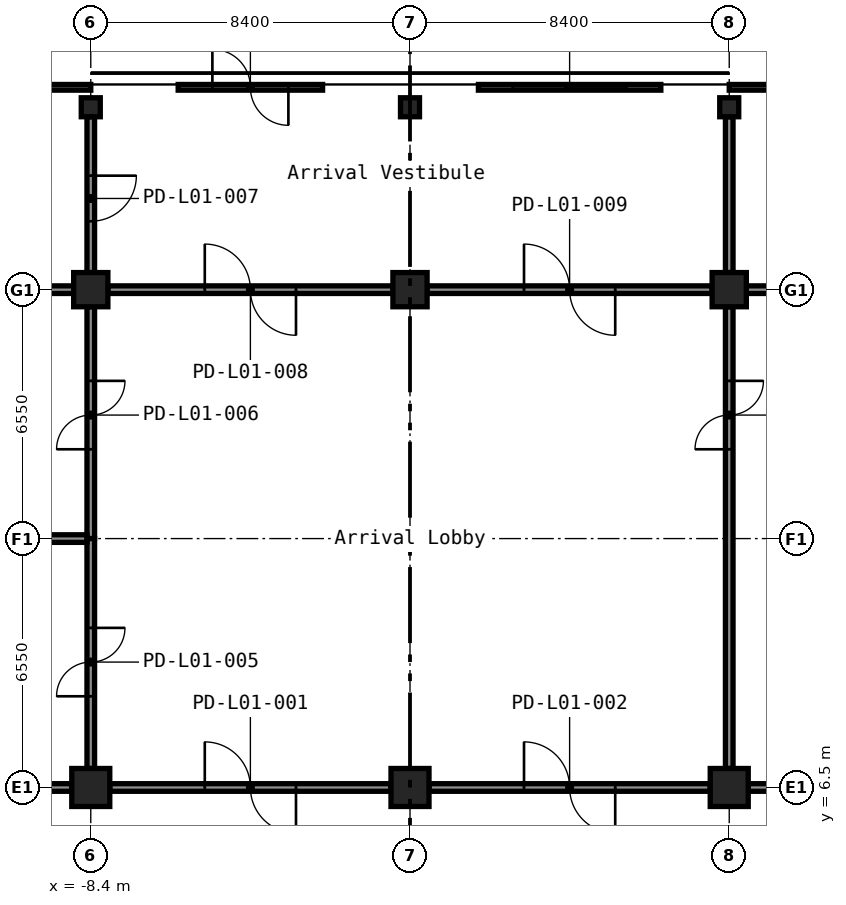
"""IFC4 building model, lengths in metres.
Left out: names, types, materials, properties, quantities, classifications, styles, units other than length and angle.
Written with IfcOpenShell. Run it as: python <this file> out.ifc"""

import sys

from ifc_helpers import new_model, si_unit, direction, frame, frame_2d, origin, origin_2d, place, context, subcontext, project, spatial, rectangle, hollow_rectangle, extrude, element, fill, save


model = new_model("IFC4")
c1 = context("Model", 3, precision=1e-05, world=origin(), true_north=direction((0.0, 1.0)))
c2 = subcontext(c1, "Body", "Model", "MODEL_VIEW")
j1 = project(units=[si_unit("LENGTHUNIT", "METRE"), si_unit("PLANEANGLEUNIT", "RADIAN")], contexts=[c1])
p1 = place(None, origin())
s1 = spatial("IfcSite", under=j1, at=p1, CompositionType="ELEMENT")
p2 = place(p1, origin())
s2 = spatial("IfcBuilding", under=s1, at=p2, CompositionType="ELEMENT")
p3 = place(p2, origin())
s3 = spatial("IfcBuildingStorey", under=s2, at=p3, CompositionType="ELEMENT", Elevation=0.0)
p4 = place(p3, frame((-8.4, 6.5, -0.3), z_axis=(0.0, 0.0, 1.0), x_axis=(1.0, 0.0, 0.0)))
e1 = element("IfcColumn", 1, at=p4, inside=s3, PredefinedType="COLUMN", context=c2, shape_type="SweptSolid", body=[
    extrude(hollow_rectangle(XDim=1.0, YDim=1.0, WallThickness=0.04, at=origin_2d()), origin(), (0.0, 0.0, 1.0), 8.9),
])
p5 = place(p3, frame((-8.4, 19.6, -0.3), z_axis=(0.0, 0.0, 1.0), x_axis=(1.0, 0.0, 0.0)))
e2 = element("IfcColumn", 2, at=p5, inside=s3, PredefinedType="COLUMN", context=c2, shape_type="SweptSolid", body=[
    extrude(hollow_rectangle(XDim=0.9, YDim=0.9, WallThickness=0.036, at=origin_2d()), origin(), (0.0, 0.0, 1.0), 8.9),
])
p6 = place(p3, frame((0.0, 6.5, -0.3), z_axis=(0.0, 0.0, 1.0), x_axis=(1.0, 0.0, 0.0)))
e3 = element("IfcColumn", 3, at=p6, inside=s3, PredefinedType="COLUMN", context=c2, shape_type="SweptSolid", body=[
    extrude(hollow_rectangle(XDim=1.0, YDim=1.0, WallThickness=0.04, at=origin_2d()), origin(), (0.0, 0.0, 1.0), 8.9),
])
p7 = place(p3, frame((0.0, 19.6, -0.3), z_axis=(0.0, 0.0, 1.0), x_axis=(1.0, 0.0, 0.0)))
e4 = element("IfcColumn", 4, at=p7, inside=s3, PredefinedType="COLUMN", context=c2, shape_type="SweptSolid", body=[
    extrude(hollow_rectangle(XDim=0.9, YDim=0.9, WallThickness=0.036, at=origin_2d()), origin(), (0.0, 0.0, 1.0), 8.9),
])
p8 = place(p3, frame((8.4, 6.5, -0.3), z_axis=(0.0, 0.0, 1.0), x_axis=(1.0, 0.0, 0.0)))
e5 = element("IfcColumn", 5, at=p8, inside=s3, PredefinedType="COLUMN", context=c2, shape_type="SweptSolid", body=[
    extrude(hollow_rectangle(XDim=1.0, YDim=1.0, WallThickness=0.04, at=origin_2d()), origin(), (0.0, 0.0, 1.0), 8.9),
])
p9 = place(p3, frame((8.4, 19.6, -0.3), z_axis=(0.0, 0.0, 1.0), x_axis=(1.0, 0.0, 0.0)))
e6 = element("IfcColumn", 6, at=p9, inside=s3, PredefinedType="COLUMN", context=c2, shape_type="SweptSolid", body=[
    extrude(hollow_rectangle(XDim=0.9, YDim=0.9, WallThickness=0.036, at=origin_2d()), origin(), (0.0, 0.0, 1.0), 8.9),
])
for number, where, z_axis, x_axis in (
    (7, (-8.4, 24.4, -0.3), (0.0, 0.0, 1.0), (1.0, 0.0, 0.0)),
    (8, (0.0, 24.4, -0.3), (0.0, 0.0, 1.0), (1.0, 0.0, 0.0)),
    (9, (8.4, 24.4, -0.3), (0.0, 0.0, 1.0), (1.0, 0.0, 0.0)),
):
    element("IfcColumn", number, at=place(p3, frame(where, z_axis=z_axis, x_axis=x_axis)), inside=s3, PredefinedType="COLUMN", context=c2, shape_type="SweptSolid", body=[
        extrude(hollow_rectangle(XDim=0.5, YDim=0.5, WallThickness=0.019, InnerFilletRadius=0.029, OuterFilletRadius=0.048, at=origin_2d()), origin(), (0.0, 0.0, 1.0), 8.9),
    ])
p10 = place(p3, frame((-8.4, 20.05, 0.0), z_axis=(0.0, 0.0, 1.0), x_axis=(0.0, 1.0, 0.0)))
e10 = element("IfcWall", 10, at=p10, inside=s3, PredefinedType="PARTITIONING", context=c2, shape_type="SweptSolid", body=[
    extrude(rectangle(XDim=4.1, YDim=0.2, at=frame_2d((2.05, 0.0))), origin(), (0.0, 0.0, 1.0), 8.6),
])
p11 = place(p10, frame((1.35, 0.0, 0.0)))
e11 = element("IfcOpeningElement", 11, at=p11, cuts=e10, PredefinedType="OPENING", context=c2, shape_type="SweptSolid", body=[
    extrude(rectangle(XDim=1.2, YDim=2.1, at=frame_2d((0.6, 1.05))), frame((0.0, 0.11, 0.0), z_axis=(0.0, -1.0, 0.0), x_axis=(1.0, 0.0, 0.0)), (0.0, 0.0, 1.0), 0.22),
])
p12 = place(p3, frame((8.4, 24.15, 0.0), z_axis=(0.0, 0.0, 1.0), x_axis=(0.0, -1.0, 0.0)))
e12 = element("IfcWall", 12, at=p12, inside=s3, PredefinedType="PARTITIONING", context=c2, shape_type="SweptSolid", body=[
    extrude(rectangle(XDim=4.1, YDim=0.2, at=frame_2d((2.05, 0.0))), origin(), (0.0, 0.0, 1.0), 8.6),
])
p13 = place(p3, frame((-16.35, 19.6, 0.0), z_axis=(0.0, 0.0, 1.0), x_axis=(1.0, 0.0, 0.0)))
e13 = element("IfcWall", 13, at=p13, inside=s3, PredefinedType="PARTITIONING", context=c2, shape_type="SweptSolid", body=[
    extrude(rectangle(XDim=7.5, YDim=0.2, at=frame_2d((3.75, 0.0))), origin(), (0.0, 0.0, 1.0), 8.6),
])
p14 = place(p3, frame((8.9, 6.5, 0.0), z_axis=(0.0, 0.0, 1.0), x_axis=(1.0, 0.0, 0.0)))
e14 = element("IfcWall", 14, at=p14, inside=s3, PredefinedType="PARTITIONING", context=c2, shape_type="SweptSolid", body=[
    extrude(rectangle(XDim=3.1, YDim=0.2, at=frame_2d((1.55, 0.0))), origin(), (0.0, 0.0, 1.0), 8.6),
])
p15 = place(p3, frame((-7.9, 6.5, 0.0), z_axis=(0.0, 0.0, 1.0), x_axis=(1.0, 0.0, 0.0)))
e15 = element("IfcWall", 15, at=p15, inside=s3, PredefinedType="PARTITIONING", context=c2, shape_type="SweptSolid", body=[
    extrude(rectangle(XDim=7.4, YDim=0.2, at=frame_2d((3.7, 0.0))), origin(), (0.0, 0.0, 1.0), 8.6),
])
p16 = place(p15, frame((2.5, 0.0, 0.0)))
e16 = element("IfcOpeningElement", 16, at=p16, cuts=e15, PredefinedType="OPENING", context=c2, shape_type="SweptSolid", body=[
    extrude(rectangle(XDim=2.4, YDim=2.1, at=frame_2d((1.2, 1.05))), frame((0.0, 0.11, 0.0), z_axis=(0.0, -1.0, 0.0), x_axis=(1.0, 0.0, 0.0)), (0.0, 0.0, 1.0), 0.22),
])
p17 = place(p3, frame((0.5, 6.5, 0.0), z_axis=(0.0, 0.0, 1.0), x_axis=(1.0, 0.0, 0.0)))
e17 = element("IfcWall", 17, at=p17, inside=s3, PredefinedType="PARTITIONING", context=c2, shape_type="SweptSolid", body=[
    extrude(rectangle(XDim=7.4, YDim=0.2, at=frame_2d((3.7, 0.0))), origin(), (0.0, 0.0, 1.0), 8.6),
])
p18 = place(p17, frame((2.5, 0.0, 0.0)))
e18 = element("IfcOpeningElement", 18, at=p18, cuts=e17, PredefinedType="OPENING", context=c2, shape_type="SweptSolid", body=[
    extrude(rectangle(XDim=2.4, YDim=2.1, at=frame_2d((1.2, 1.05))), frame((0.0, 0.11, 0.0), z_axis=(0.0, -1.0, 0.0), x_axis=(1.0, 0.0, 0.0)), (0.0, 0.0, 1.0), 0.22),
])
p19 = place(p3, frame((-12.0, 6.5, 0.0), z_axis=(0.0, 0.0, 1.0), x_axis=(1.0, 0.0, 0.0)))
e19 = element("IfcWall", 19, at=p19, inside=s3, PredefinedType="PARTITIONING", context=c2, shape_type="SweptSolid", body=[
    extrude(rectangle(XDim=3.1, YDim=0.2, at=frame_2d((1.55, 0.0))), origin(), (0.0, 0.0, 1.0), 8.6),
])
p20 = place(p3, frame((8.85, 19.6, 0.0), z_axis=(0.0, 0.0, 1.0), x_axis=(1.0, 0.0, 0.0)))
e20 = element("IfcWall", 20, at=p20, inside=s3, PredefinedType="PARTITIONING", context=c2, shape_type="SweptSolid", body=[
    extrude(rectangle(XDim=7.5, YDim=0.2, at=frame_2d((3.75, 0.0))), origin(), (0.0, 0.0, 1.0), 8.6),
])
p21 = place(p20, frame((2.55, 0.0, 0.0)))
e21 = element("IfcOpeningElement", 21, at=p21, cuts=e20, PredefinedType="OPENING", context=c2, shape_type="SweptSolid", body=[
    extrude(rectangle(XDim=2.4, YDim=2.1, at=frame_2d((1.2, 1.05))), frame((0.0, 0.11, 0.0), z_axis=(0.0, -1.0, 0.0), x_axis=(1.0, 0.0, 0.0)), (0.0, 0.0, 1.0), 0.22),
])
p22 = place(p3, frame((-7.95, 19.6, 0.0), z_axis=(0.0, 0.0, 1.0), x_axis=(1.0, 0.0, 0.0)))
e22 = element("IfcWall", 22, at=p22, inside=s3, PredefinedType="PARTITIONING", context=c2, shape_type="SweptSolid", body=[
    extrude(rectangle(XDim=7.5, YDim=0.2, at=frame_2d((3.75, 0.0))), origin(), (0.0, 0.0, 1.0), 8.6),
])
p23 = place(p22, frame((2.55, 0.0, 0.0)))
e23 = element("IfcOpeningElement", 23, at=p23, cuts=e22, PredefinedType="OPENING", context=c2, shape_type="SweptSolid", body=[
    extrude(rectangle(XDim=2.4, YDim=2.1, at=frame_2d((1.2, 1.05))), frame((0.0, 0.11, 0.0), z_axis=(0.0, -1.0, 0.0), x_axis=(1.0, 0.0, 0.0)), (0.0, 0.0, 1.0), 0.22),
])
p24 = place(p3, frame((0.45, 19.6, 0.0), z_axis=(0.0, 0.0, 1.0), x_axis=(1.0, 0.0, 0.0)))
e24 = element("IfcWall", 24, at=p24, inside=s3, PredefinedType="PARTITIONING", context=c2, shape_type="SweptSolid", body=[
    extrude(rectangle(XDim=7.5, YDim=0.2, at=frame_2d((3.75, 0.0))), origin(), (0.0, 0.0, 1.0), 8.6),
])
p25 = place(p24, frame((2.55, 0.0, 0.0)))
e25 = element("IfcOpeningElement", 25, at=p25, cuts=e24, PredefinedType="OPENING", context=c2, shape_type="SweptSolid", body=[
    extrude(rectangle(XDim=2.4, YDim=2.1, at=frame_2d((1.2, 1.05))), frame((0.0, 0.11, 0.0), z_axis=(0.0, -1.0, 0.0), x_axis=(1.0, 0.0, 0.0)), (0.0, 0.0, 1.0), 0.22),
])
p26 = place(p3, frame((-8.4, 13.05, 0.0), z_axis=(0.0, 0.0, 1.0), x_axis=(0.0, 1.0, 0.0)))
e26 = element("IfcWall", 26, at=p26, inside=s3, PredefinedType="PARTITIONING", context=c2, shape_type="SweptSolid", body=[
    extrude(rectangle(XDim=6.1, YDim=0.2, at=frame_2d((3.05, 0.0))), origin(), (0.0, 0.0, 1.0), 8.6),
])
p27 = place(p26, frame((2.35, 0.0, 0.0)))
e27 = element("IfcOpeningElement", 27, at=p27, cuts=e26, PredefinedType="OPENING", context=c2, shape_type="SweptSolid", body=[
    extrude(rectangle(XDim=1.8, YDim=2.1, at=frame_2d((0.9, 1.05))), frame((0.0, 0.11, 0.0), z_axis=(0.0, -1.0, 0.0), x_axis=(1.0, 0.0, 0.0)), (0.0, 0.0, 1.0), 0.22),
])
p28 = place(p3, frame((8.4, 19.15, 0.0), z_axis=(0.0, 0.0, 1.0), x_axis=(0.0, -1.0, 0.0)))
e28 = element("IfcWall", 28, at=p28, inside=s3, PredefinedType="PARTITIONING", context=c2, shape_type="SweptSolid", body=[
    extrude(rectangle(XDim=12.15, YDim=0.2, at=frame_2d((6.075, 0.0))), origin(), (0.0, 0.0, 1.0), 8.6),
])
p29 = place(p28, frame((1.95, 0.0, 0.0)))
e29 = element("IfcOpeningElement", 29, at=p29, cuts=e28, PredefinedType="OPENING", context=c2, shape_type="SweptSolid", body=[
    extrude(rectangle(XDim=1.8, YDim=2.1, at=frame_2d((0.9, 1.05))), frame((0.0, 0.11, 0.0), z_axis=(0.0, -1.0, 0.0), x_axis=(1.0, 0.0, 0.0)), (0.0, 0.0, 1.0), 0.22),
])
p30 = place(p3, frame((-8.4, 7.0, 0.0), z_axis=(0.0, 0.0, 1.0), x_axis=(0.0, 1.0, 0.0)))
e30 = element("IfcWall", 30, at=p30, inside=s3, PredefinedType="PARTITIONING", context=c2, shape_type="SweptSolid", body=[
    extrude(rectangle(XDim=6.05, YDim=0.2, at=frame_2d((3.025, 0.0))), origin(), (0.0, 0.0, 1.0), 8.6),
])
p31 = place(p30, frame((1.9, 0.0, 0.0)))
e31 = element("IfcOpeningElement", 31, at=p31, cuts=e30, PredefinedType="OPENING", context=c2, shape_type="SweptSolid", body=[
    extrude(rectangle(XDim=1.8, YDim=2.1, at=frame_2d((0.9, 1.05))), frame((0.0, 0.11, 0.0), z_axis=(0.0, -1.0, 0.0), x_axis=(1.0, 0.0, 0.0)), (0.0, 0.0, 1.0), 0.22),
])
p32 = place(p3, frame((-16.7, 13.05, 0.0), z_axis=(0.0, 0.0, 1.0), x_axis=(1.0, 0.0, 0.0)))
e32 = element("IfcWall", 32, at=p32, inside=s3, PredefinedType="PARTITIONING", context=c2, shape_type="SweptSolid", body=[
    extrude(rectangle(XDim=8.2, YDim=0.2, at=frame_2d((4.1, 0.0))), origin(), (0.0, 0.0, 1.0), 8.6),
])
p33 = place(p3, frame((-23.6, 24.925, 0.0), z_axis=(0.0, 0.0, 1.0), x_axis=(1.0, 0.0, 0.0)))
e33 = element("IfcWall", 33, at=p33, inside=s3, PredefinedType="STANDARD", context=c2, shape_type="SweptSolid", body=[
    extrude(rectangle(XDim=15.2, YDim=0.15, at=frame_2d((7.6, 0.0))), origin(), (0.0, 0.0, 1.0), 8.6),
])
p34 = place(p33, frame((0.9, 0.0, 0.0)))
e34 = element("IfcOpeningElement", 34, at=p34, cuts=e33, PredefinedType="OPENING", context=c2, shape_type="SweptSolid", body=[
    extrude(rectangle(XDim=1.8, YDim=2.1, at=frame_2d((0.9, 1.05))), frame((0.0, 0.085, 0.0), z_axis=(0.0, -1.0, 0.0), x_axis=(1.0, 0.0, 0.0)), (0.0, 0.0, 1.0), 0.17),
])
p35 = place(p3, frame((-6.1, 24.925, 0.0), z_axis=(0.0, 0.0, 1.0), x_axis=(1.0, 0.0, 0.0)))
e35 = element("IfcWall", 35, at=p35, inside=s3, PredefinedType="STANDARD", context=c2, shape_type="SweptSolid", body=[
    extrude(rectangle(XDim=3.8, YDim=0.15, at=frame_2d((1.9, 0.0))), origin(), (0.0, 0.0, 1.0), 8.6),
])
p36 = place(p35, frame((0.9, 0.0, 0.0)))
e36 = element("IfcOpeningElement", 36, at=p36, cuts=e35, PredefinedType="OPENING", context=c2, shape_type="SweptSolid", body=[
    extrude(rectangle(XDim=2.0, YDim=2.1, at=frame_2d((1.0, 1.05))), frame((0.0, 0.085, 0.0), z_axis=(0.0, -1.0, 0.0), x_axis=(1.0, 0.0, 0.0)), (0.0, 0.0, 1.0), 0.17),
])
p37 = place(p3, frame((1.8, 24.925, 0.0), z_axis=(0.0, 0.0, 1.0), x_axis=(1.0, 0.0, 0.0)))
e37 = element("IfcWall", 37, at=p37, inside=s3, PredefinedType="STANDARD", context=c2, shape_type="SweptSolid", body=[
    extrude(rectangle(XDim=4.8, YDim=0.15, at=frame_2d((2.4, 0.0))), origin(), (0.0, 0.0, 1.0), 8.6),
])
p38 = place(p37, frame((0.9, 0.0, 0.0)))
e38 = element("IfcOpeningElement", 38, at=p38, cuts=e37, PredefinedType="OPENING", context=c2, shape_type="SweptSolid", body=[
    extrude(rectangle(XDim=3.0, YDim=2.4, at=frame_2d((1.5, 1.2))), frame((0.0, 0.085, 0.0), z_axis=(0.0, -1.0, 0.0), x_axis=(1.0, 0.0, 0.0)), (0.0, 0.0, 1.0), 0.17),
])
p39 = place(p3, frame((8.4, 24.925, 0.0), z_axis=(0.0, 0.0, 1.0), x_axis=(1.0, 0.0, 0.0)))
e39 = element("IfcWall", 39, at=p39, inside=s3, PredefinedType="STANDARD", context=c2, shape_type="SweptSolid", body=[
    extrude(rectangle(XDim=15.2, YDim=0.15, at=frame_2d((7.6, 0.0))), origin(), (0.0, 0.0, 1.0), 8.6),
])
p40 = place(p39, frame((12.5, 0.0, 0.0)))
e40 = element("IfcOpeningElement", 40, at=p40, cuts=e39, PredefinedType="OPENING", context=c2, shape_type="SweptSolid", body=[
    extrude(rectangle(XDim=1.8, YDim=2.1, at=frame_2d((0.9, 1.05))), frame((0.0, 0.085, 0.0), z_axis=(0.0, -1.0, 0.0), x_axis=(1.0, 0.0, 0.0)), (0.0, 0.0, 1.0), 0.17),
])
p41 = place(p16, origin())
e41 = element("IfcDoor", 41, at=p41, inside=s3, OperationType="DOUBLE_DOOR_DOUBLE_SWING", PredefinedType="DOOR", context=c2, shape_type="SweptSolid", body=[
    extrude(rectangle(XDim=2.4, YDim=2.1, at=frame_2d((1.2, 1.05))), frame((0.0, 0.025, 0.0), z_axis=(0.0, -1.0, 0.0), x_axis=(1.0, 0.0, 0.0)), (0.0, 0.0, 1.0), 0.05),
])
fill(e16, e41)
p42 = place(p18, origin())
e42 = element("IfcDoor", 42, at=p42, inside=s3, OperationType="DOUBLE_DOOR_DOUBLE_SWING", PredefinedType="DOOR", context=c2, shape_type="SweptSolid", body=[
    extrude(rectangle(XDim=2.4, YDim=2.1, at=frame_2d((1.2, 1.05))), frame((0.0, 0.025, 0.0), z_axis=(0.0, -1.0, 0.0), x_axis=(1.0, 0.0, 0.0)), (0.0, 0.0, 1.0), 0.05),
])
fill(e18, e42)
p43 = place(p31, origin())
e43 = element("IfcDoor", 43, at=p43, inside=s3, OperationType="DOUBLE_DOOR_DOUBLE_SWING", PredefinedType="DOOR", context=c2, shape_type="SweptSolid", body=[
    extrude(rectangle(XDim=1.8, YDim=2.1, at=frame_2d((0.9, 1.05))), frame((0.0, 0.025, 0.0), z_axis=(0.0, -1.0, 0.0), x_axis=(1.0, 0.0, 0.0)), (0.0, 0.0, 1.0), 0.05),
])
fill(e31, e43)
p44 = place(p27, origin())
e44 = element("IfcDoor", 44, at=p44, inside=s3, OperationType="DOUBLE_DOOR_DOUBLE_SWING", PredefinedType="DOOR", context=c2, shape_type="SweptSolid", body=[
    extrude(rectangle(XDim=1.8, YDim=2.1, at=frame_2d((0.9, 1.05))), frame((0.0, 0.025, 0.0), z_axis=(0.0, -1.0, 0.0), x_axis=(1.0, 0.0, 0.0)), (0.0, 0.0, 1.0), 0.05),
])
fill(e27, e44)
p45 = place(p11, origin())
e45 = element("IfcDoor", 45, at=p45, inside=s3, OperationType="SINGLE_SWING_RIGHT", PredefinedType="DOOR", context=c2, shape_type="SweptSolid", body=[
    extrude(rectangle(XDim=1.2, YDim=2.1, at=frame_2d((0.6, 1.05))), frame((0.0, 0.025, 0.0), z_axis=(0.0, -1.0, 0.0), x_axis=(1.0, 0.0, 0.0)), (0.0, 0.0, 1.0), 0.05),
])
fill(e11, e45)
p46 = place(p23, origin())
e46 = element("IfcDoor", 46, at=p46, inside=s3, OperationType="DOUBLE_DOOR_DOUBLE_SWING", PredefinedType="DOOR", context=c2, shape_type="SweptSolid", body=[
    extrude(rectangle(XDim=2.4, YDim=2.1, at=frame_2d((1.2, 1.05))), frame((0.0, 0.025, 0.0), z_axis=(0.0, -1.0, 0.0), x_axis=(1.0, 0.0, 0.0)), (0.0, 0.0, 1.0), 0.05),
])
fill(e23, e46)
p47 = place(p25, origin())
e47 = element("IfcDoor", 47, at=p47, inside=s3, OperationType="DOUBLE_DOOR_DOUBLE_SWING", PredefinedType="DOOR", context=c2, shape_type="SweptSolid", body=[
    extrude(rectangle(XDim=2.4, YDim=2.1, at=frame_2d((1.2, 1.05))), frame((0.0, 0.025, 0.0), z_axis=(0.0, -1.0, 0.0), x_axis=(1.0, 0.0, 0.0)), (0.0, 0.0, 1.0), 0.05),
])
fill(e25, e47)
p48 = place(p29, origin())
e48 = element("IfcDoor", 48, at=p48, inside=s3, OperationType="DOUBLE_DOOR_DOUBLE_SWING", PredefinedType="DOOR", context=c2, shape_type="SweptSolid", body=[
    extrude(rectangle(XDim=1.8, YDim=2.1, at=frame_2d((0.9, 1.05))), frame((0.0, 0.025, 0.0), z_axis=(0.0, -1.0, 0.0), x_axis=(1.0, 0.0, 0.0)), (0.0, 0.0, 1.0), 0.05),
])
fill(e29, e48)
p49 = place(p36, origin())
e49 = element("IfcDoor", 49, at=p49, inside=s3, OperationType="DOUBLE_DOOR_DOUBLE_SWING", PredefinedType="DOOR", context=c2, shape_type="SweptSolid", body=[
    extrude(rectangle(XDim=2.0, YDim=2.1, at=frame_2d((1.0, 1.05))), frame((0.0, 0.025, 0.0), z_axis=(0.0, -1.0, 0.0), x_axis=(1.0, 0.0, 0.0)), (0.0, 0.0, 1.0), 0.05),
])
fill(e36, e49)
p50 = place(p38, origin())
e50 = element("IfcDoor", 50, at=p50, inside=s3, OperationType="REVOLVING", PredefinedType="DOOR", context=c2, shape_type="SweptSolid", body=[
    extrude(rectangle(XDim=3.0, YDim=2.4, at=frame_2d((1.5, 1.2))), frame((0.0, 0.025, 0.0), z_axis=(0.0, -1.0, 0.0), x_axis=(1.0, 0.0, 0.0)), (0.0, 0.0, 1.0), 0.05),
])
fill(e38, e50)
save(model, sys.argv[1])
